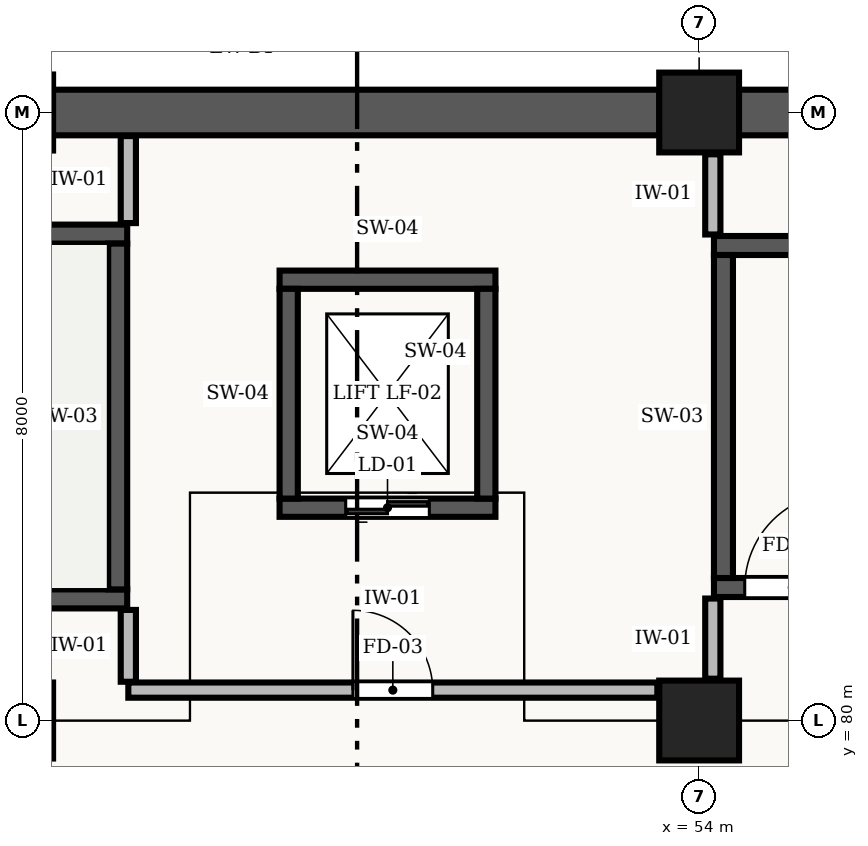
"""IFC4 building model, lengths in metres.
Left out: names, types, materials, properties, quantities, classifications, styles, units other than length and angle.
Written with IfcOpenShell. Run it as: python <this file> out.ifc"""

import sys

from ifc_helpers import new_model, si_unit, direction, frame, frame_2d, origin, origin_2d, place, context, subcontext, project, spatial, rectangle, extrude, element, fill, save


model = new_model("IFC4")
c1 = context("Model", 3, precision=1e-05, world=origin(), true_north=direction((0.0, 1.0)))
c2 = subcontext(c1, "Body", "Model", "MODEL_VIEW")
j1 = project(units=[si_unit("LENGTHUNIT", "METRE"), si_unit("PLANEANGLEUNIT", "RADIAN")], contexts=[c1])
p1 = place(None, origin())
s1 = spatial("IfcSite", under=j1, at=p1, CompositionType="ELEMENT")
p2 = place(p1, origin())
s2 = spatial("IfcBuilding", under=s1, at=p2, CompositionType="ELEMENT")
p3 = place(p2, frame((0.0, 0.0, -12.0)))
s3 = spatial("IfcBuildingStorey", under=s2, at=p3, CompositionType="ELEMENT", Elevation=-12.0)
for number, where, z_axis, x_axis in (
    (1, (45.0, 80.0, 0.0), (0.0, 0.0, 1.0), (1.0, 0.0, 0.0)),
    (2, (45.0, 88.0, 0.0), (0.0, 0.0, 1.0), (1.0, 0.0, 0.0)),
):
    element("IfcColumn", number, at=place(p3, frame(where, z_axis=z_axis, x_axis=x_axis)), inside=s3, PredefinedType="COLUMN", context=c2, shape_type="SweptSolid", body=[
        extrude(rectangle(XDim=1.0, YDim=1.0, at=origin_2d()), origin(), (0.0, 0.0, 1.0), 6.0),
    ])
for number, where, z_axis, x_axis in (
    (3, (54.0, 80.0, 0.0), (0.0, 0.0, 1.0), (1.0, 0.0, 0.0)),
    (4, (54.0, 88.0, 0.0), (0.0, 0.0, 1.0), (1.0, 0.0, 0.0)),
):
    element("IfcColumn", number, at=place(p3, frame(where, z_axis=z_axis, x_axis=x_axis)), inside=s3, PredefinedType="COLUMN", context=c2, shape_type="SweptSolid", body=[
        extrude(rectangle(XDim=1.05, YDim=1.05, at=origin_2d()), origin(), (0.0, 0.0, 1.0), 6.0),
    ])
for number, where, z_axis, x_axis in (
    (5, (45.498, 88.0, 0.0), (0.0, 0.0, 1.0), (1.0, 0.0, 0.0)),
    (6, (54.523, 88.0, 0.0), (0.0, 0.0, 1.0), (1.0, 0.0, 0.0)),
):
    element("IfcWall", number, at=place(p3, frame(where, z_axis=z_axis, x_axis=x_axis)), inside=s3, PredefinedType="STANDARD", context=c2, shape_type="SweptSolid", body=[
        extrude(rectangle(XDim=7.979, YDim=0.6, at=frame_2d((3.99, 0.0))), origin(), (0.0, 0.0, 1.0), 5.54),
    ])
p4 = place(p3, frame((36.975, 81.6, 0.0), z_axis=(0.0, 0.0, 1.0), x_axis=(1.0, 0.0, 0.0)))
e7 = element("IfcWall", 7, at=p4, inside=s3, PredefinedType="SHEAR", context=c2, shape_type="SweptSolid", body=[
    extrude(rectangle(XDim=9.5, YDim=0.25, at=frame_2d((4.75, 0.0))), origin(), (0.0, 0.0, 1.0), 5.53),
])
p5 = place(p4, frame((0.445, 0.0, 0.0)))
e8 = element("IfcOpeningElement", 8, at=p5, cuts=e7, PredefinedType="OPENING", context=c2, shape_type="SweptSolid", body=[
    extrude(rectangle(XDim=1.25, YDim=2.15, at=frame_2d((0.625, 1.075))), frame((0.0, 0.137, 0.0), z_axis=(0.0, -1.0, 0.0), x_axis=(1.0, 0.0, 0.0)), (0.0, 0.0, 1.0), 0.274),
])
p6 = place(p3, frame((46.475, 86.4, 0.0), z_axis=(0.0, 0.0, 1.0), x_axis=(-1.0, 0.0, 0.0)))
e9 = element("IfcWall", 9, at=p6, inside=s3, PredefinedType="SHEAR", context=c2, shape_type="SweptSolid", body=[
    extrude(rectangle(XDim=9.5, YDim=0.25, at=frame_2d((4.75, 0.0))), origin(), (0.0, 0.0, 1.0), 5.53),
])
p7 = place(p3, frame((46.35, 81.725, 0.0), z_axis=(0.0, 0.0, 1.0), x_axis=(0.0, 1.0, 0.0)))
e10 = element("IfcWall", 10, at=p7, inside=s3, PredefinedType="SHEAR", context=c2, shape_type="SweptSolid", body=[
    extrude(rectangle(XDim=4.55, YDim=0.25, at=frame_2d((2.275, 0.0))), origin(), (0.0, 0.0, 1.0), 5.53),
])
p8 = place(p3, frame((54.195, 81.75, 0.0), z_axis=(0.0, 0.0, 1.0), x_axis=(1.0, 0.0, 0.0)))
e11 = element("IfcWall", 11, at=p8, inside=s3, PredefinedType="SHEAR", context=c2, shape_type="SweptSolid", body=[
    extrude(rectangle(XDim=8.49, YDim=0.25, at=frame_2d((4.245, 0.0))), origin(), (0.0, 0.0, 1.0), 5.53),
])
p9 = place(p8, frame((0.405, 0.0, 0.0)))
e12 = element("IfcOpeningElement", 12, at=p9, cuts=e11, PredefinedType="OPENING", context=c2, shape_type="SweptSolid", body=[
    extrude(rectangle(XDim=1.25, YDim=2.15, at=frame_2d((0.625, 1.075))), frame((0.0, 0.137, 0.0), z_axis=(0.0, -1.0, 0.0), x_axis=(1.0, 0.0, 0.0)), (0.0, 0.0, 1.0), 0.274),
])
p10 = place(p3, frame((62.685, 86.25, 0.0), z_axis=(0.0, 0.0, 1.0), x_axis=(-1.0, 0.0, 0.0)))
e13 = element("IfcWall", 13, at=p10, inside=s3, PredefinedType="SHEAR", context=c2, shape_type="SweptSolid", body=[
    extrude(rectangle(XDim=8.49, YDim=0.25, at=frame_2d((4.245, 0.0))), origin(), (0.0, 0.0, 1.0), 5.53),
])
p11 = place(p3, frame((54.32, 86.125, 0.0), z_axis=(0.0, 0.0, 1.0), x_axis=(0.0, -1.0, 0.0)))
e14 = element("IfcWall", 14, at=p11, inside=s3, PredefinedType="SHEAR", context=c2, shape_type="SweptSolid", body=[
    extrude(rectangle(XDim=4.25, YDim=0.25, at=frame_2d((2.125, 0.0))), origin(), (0.0, 0.0, 1.0), 5.53),
])
p12 = place(p3, frame((48.48, 82.8, 0.0), z_axis=(0.0, 0.0, 1.0), x_axis=(1.0, 0.0, 0.0)))
e15 = element("IfcWall", 15, at=p12, inside=s3, PredefinedType="SHEAR", context=c2, shape_type="SweptSolid", body=[
    extrude(rectangle(XDim=2.84, YDim=0.24, at=frame_2d((1.42, 0.0))), origin(), (0.0, 0.0, 1.0), 5.53),
])
p13 = place(p12, frame((0.87, 0.0, 0.0)))
e16 = element("IfcOpeningElement", 16, at=p13, cuts=e15, PredefinedType="OPENING", context=c2, shape_type="SweptSolid", body=[
    extrude(rectangle(XDim=1.1, YDim=2.2, at=frame_2d((0.55, 1.1))), frame((0.0, 0.132, 0.0), z_axis=(0.0, -1.0, 0.0), x_axis=(1.0, 0.0, 0.0)), (0.0, 0.0, 1.0), 0.264),
])
p14 = place(p3, frame((51.32, 85.8, 0.0), z_axis=(0.0, 0.0, 1.0), x_axis=(-1.0, 0.0, 0.0)))
e17 = element("IfcWall", 17, at=p14, inside=s3, PredefinedType="SHEAR", context=c2, shape_type="SweptSolid", body=[
    extrude(rectangle(XDim=2.84, YDim=0.24, at=frame_2d((1.42, 0.0))), origin(), (0.0, 0.0, 1.0), 5.53),
])
for number, where, z_axis, x_axis in (
    (18, (48.6, 85.68, 0.0), (0.0, 0.0, 1.0), (0.0, -1.0, 0.0)),
    (19, (51.2, 82.92, 0.0), (0.0, 0.0, 1.0), (0.0, 1.0, 0.0)),
):
    element("IfcWall", number, at=place(p3, frame(where, z_axis=z_axis, x_axis=x_axis)), inside=s3, PredefinedType="SHEAR", context=c2, shape_type="SweptSolid", body=[
        extrude(rectangle(XDim=2.76, YDim=0.24, at=frame_2d((1.38, 0.0))), origin(), (0.0, 0.0, 1.0), 5.53),
    ])
p15 = place(p3, frame((46.49, 80.4, 0.0), z_axis=(0.0, 0.0, 1.0), x_axis=(1.0, 0.0, 0.0)))
e20 = element("IfcWall", 20, at=p15, inside=s3, PredefinedType="STANDARD", context=c2, shape_type="SweptSolid", body=[
    extrude(rectangle(XDim=6.96, YDim=0.2, at=frame_2d((3.48, 0.0))), origin(), (0.0, 0.0, 1.0), 5.53),
])
p16 = place(p15, frame((2.955, 0.0, 0.0)))
e21 = element("IfcOpeningElement", 21, at=p16, cuts=e20, PredefinedType="OPENING", context=c2, shape_type="SweptSolid", body=[
    extrude(rectangle(XDim=1.05, YDim=2.15, at=frame_2d((0.525, 1.075))), frame((0.0, 0.112, 0.0), z_axis=(0.0, -1.0, 0.0), x_axis=(1.0, 0.0, 0.0)), (0.0, 0.0, 1.0), 0.224),
])
p17 = place(p3, frame((46.49, 80.51, 0.0), z_axis=(0.0, 0.0, 1.0), x_axis=(0.0, 1.0, 0.0)))
e22 = element("IfcWall", 22, at=p17, inside=s3, PredefinedType="STANDARD", context=c2, shape_type="SweptSolid", body=[
    extrude(rectangle(XDim=0.945, YDim=0.2, at=frame_2d((0.473, 0.0))), origin(), (0.0, 0.0, 1.0), 5.53),
])
p18 = place(p3, frame((46.49, 86.545, 0.0), z_axis=(0.0, 0.0, 1.0), x_axis=(0.0, 1.0, 0.0)))
e23 = element("IfcWall", 23, at=p18, inside=s3, PredefinedType="STANDARD", context=c2, shape_type="SweptSolid", body=[
    extrude(rectangle(XDim=1.145, YDim=0.2, at=frame_2d((0.573, 0.0))), origin(), (0.0, 0.0, 1.0), 5.53),
])
for number, where, z_axis, x_axis in (
    (24, (54.18, 80.55, 0.0), (0.0, 0.0, 1.0), (0.0, 1.0, 0.0)),
    (25, (54.18, 86.395, 0.0), (0.0, 0.0, 1.0), (0.0, 1.0, 0.0)),
):
    element("IfcWall", number, at=place(p3, frame(where, z_axis=z_axis, x_axis=x_axis)), inside=s3, PredefinedType="STANDARD", context=c2, shape_type="SweptSolid", body=[
        extrude(rectangle(XDim=1.055, YDim=0.2, at=frame_2d((0.527, 0.0))), origin(), (0.0, 0.0, 1.0), 4.71),
    ])
p19 = place(p9, origin())
e26 = element("IfcDoor", 26, at=p19, inside=s3, OperationType="SINGLE_SWING_RIGHT", PredefinedType="DOOR", context=c2, shape_type="SweptSolid", body=[
    extrude(rectangle(XDim=1.25, YDim=2.15, at=frame_2d((0.625, 1.075))), frame((0.0, 0.025, 0.0), z_axis=(0.0, -1.0, 0.0), x_axis=(1.0, 0.0, 0.0)), (0.0, 0.0, 1.0), 0.05),
])
fill(e12, e26)
p20 = place(p13, origin())
e27 = element("IfcDoor", 27, at=p20, inside=s3, OperationType="DOUBLE_DOOR_SLIDING", PredefinedType="DOOR", context=c2, shape_type="SweptSolid", body=[
    extrude(rectangle(XDim=1.1, YDim=2.2, at=frame_2d((0.55, 1.1))), frame((0.0, 0.025, 0.0), z_axis=(0.0, -1.0, 0.0), x_axis=(1.0, 0.0, 0.0)), (0.0, 0.0, 1.0), 0.05),
])
fill(e16, e27)
p21 = place(p16, origin())
e28 = element("IfcDoor", 28, at=p21, inside=s3, OperationType="SINGLE_SWING_LEFT", PredefinedType="DOOR", context=c2, shape_type="SweptSolid", body=[
    extrude(rectangle(XDim=1.05, YDim=2.15, at=frame_2d((0.525, 1.075))), frame((0.0, 0.025, 0.0), z_axis=(0.0, -1.0, 0.0), x_axis=(1.0, 0.0, 0.0)), (0.0, 0.0, 1.0), 0.05),
])
fill(e21, e28)
save(model, sys.argv[1])
